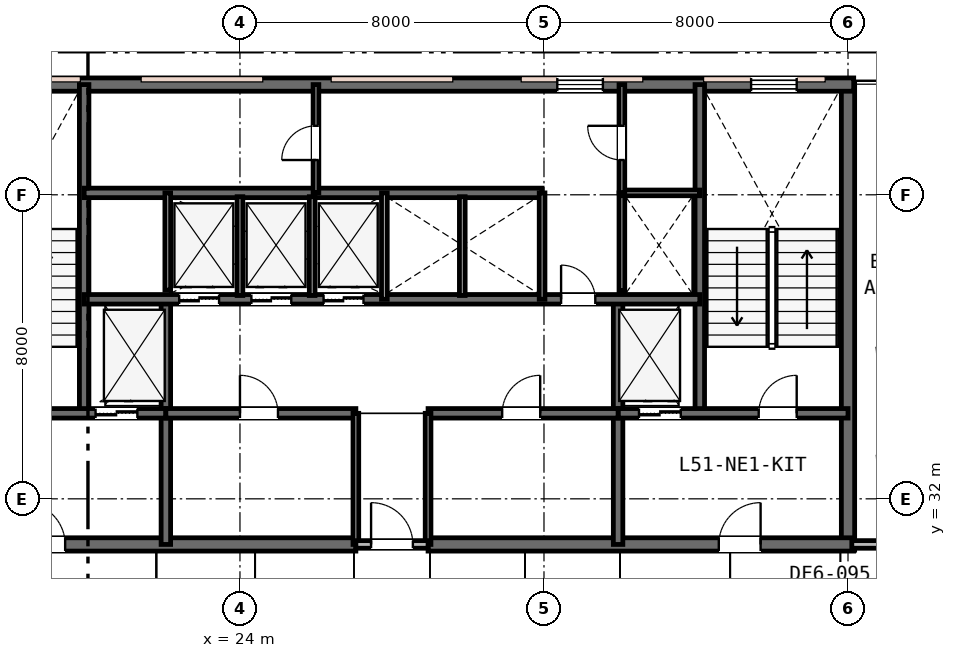
"""IFC4 building model, lengths in metres.
Left out: names, types, materials, properties, quantities, classifications, styles, units other than length and angle.
Written with IfcOpenShell. Run it as: python <this file> out.ifc"""

import sys

from ifc_helpers import new_model, si_unit, direction, frame, frame_2d, origin, place, context, subcontext, project, spatial, rectangle, extrude, element, fill, save


model = new_model("IFC4")
c1 = context("Model", 3, precision=1e-05, world=origin(), true_north=direction((0.0, 1.0)))
c2 = subcontext(c1, "Body", "Model", "MODEL_VIEW")
j1 = project(units=[si_unit("LENGTHUNIT", "METRE"), si_unit("PLANEANGLEUNIT", "RADIAN")], contexts=[c1])
p1 = place(None, origin())
s1 = spatial("IfcSite", under=j1, at=p1, CompositionType="ELEMENT")
p2 = place(p1, origin())
s2 = spatial("IfcBuilding", under=s1, at=p2, CompositionType="ELEMENT")
p3 = place(p2, frame((0.0, 0.0, 197.4)))
s3 = spatial("IfcBuildingStorey", under=s2, at=p3, CompositionType="ELEMENT", Elevation=197.4)
p4 = place(p3, frame((40.0, 30.65, 0.0), z_axis=(0.0, 0.0, 1.0), x_axis=(0.0, 1.0, 0.0)))
e1 = element("IfcWall", 1, at=p4, inside=s3, PredefinedType="SHEAR", context=c2, shape_type="SweptSolid", body=[
    extrude(rectangle(XDim=12.3, YDim=0.35, at=frame_2d((6.15, 0.0))), origin(), (0.0, 0.0, 1.0), 3.6),
])
p5 = place(p3, frame((15.85, 42.9, 0.0), z_axis=(0.0, 0.0, 1.0), x_axis=(1.0, 0.0, 0.0)))
e2 = element("IfcWall", 2, at=p5, inside=s3, PredefinedType="SHEAR", context=c2, shape_type="SweptSolid", body=[
    extrude(rectangle(XDim=24.3, YDim=0.35, at=frame_2d((12.15, 0.0))), origin(), (0.0, 0.0, 1.0), 3.6),
])
p6 = place(p5, frame((1.6, 0.0, 0.95)))
e3 = element("IfcOpeningElement", 3, at=p6, cuts=e2, PredefinedType="OPENING", context=c2, shape_type="SweptSolid", body=[
    extrude(rectangle(XDim=1.2, YDim=1.6, at=frame_2d((0.6, 0.8))), frame((0.0, 0.185, 0.0), z_axis=(0.0, -1.0, 0.0), x_axis=(1.0, 0.0, 0.0)), (0.0, 0.0, 1.0), 0.37),
])
p7 = place(p5, frame((16.5, 0.0, 0.95)))
e4 = element("IfcOpeningElement", 4, at=p7, cuts=e2, PredefinedType="OPENING", context=c2, shape_type="SweptSolid", body=[
    extrude(rectangle(XDim=1.2, YDim=1.6, at=frame_2d((0.6, 0.8))), frame((0.0, 0.185, 0.0), z_axis=(0.0, -1.0, 0.0), x_axis=(1.0, 0.0, 0.0)), (0.0, 0.0, 1.0), 0.37),
])
p8 = place(p5, frame((21.6, 0.0, 0.95)))
e5 = element("IfcOpeningElement", 5, at=p8, cuts=e2, PredefinedType="OPENING", context=c2, shape_type="SweptSolid", body=[
    extrude(rectangle(XDim=1.2, YDim=1.6, at=frame_2d((0.6, 0.8))), frame((0.0, 0.185, 0.0), z_axis=(0.0, -1.0, 0.0), x_axis=(1.0, 0.0, 0.0)), (0.0, 0.0, 1.0), 0.37),
])
p9 = place(p3, frame((15.85, 30.8, 0.0), z_axis=(0.0, 0.0, 1.0), x_axis=(1.0, 0.0, 0.0)))
e6 = element("IfcWall", 6, at=p9, inside=s3, PredefinedType="SHEAR", context=c2, shape_type="SweptSolid", body=[
    extrude(rectangle(XDim=11.2, YDim=0.35, at=frame_2d((5.6, 0.0))), origin(), (0.0, 0.0, 1.0), 3.6),
])
p10 = place(p9, frame((2.45, 0.0, 0.0)))
e7 = element("IfcOpeningElement", 7, at=p10, cuts=e6, PredefinedType="OPENING", context=c2, shape_type="SweptSolid", body=[
    extrude(rectangle(XDim=1.1, YDim=2.15, at=frame_2d((0.55, 1.075))), frame((0.0, 0.185, 0.0), z_axis=(0.0, -1.0, 0.0), x_axis=(1.0, 0.0, 0.0)), (0.0, 0.0, 1.0), 0.37),
])
p11 = place(p3, frame((28.95, 30.8, 0.0), z_axis=(0.0, 0.0, 1.0), x_axis=(1.0, 0.0, 0.0)))
e8 = element("IfcWall", 8, at=p11, inside=s3, PredefinedType="SHEAR", context=c2, shape_type="SweptSolid", body=[
    extrude(rectangle(XDim=11.2, YDim=0.35, at=frame_2d((5.6, 0.0))), origin(), (0.0, 0.0, 1.0), 3.6),
])
p12 = place(p11, frame((7.65, 0.0, 0.0)))
e9 = element("IfcOpeningElement", 9, at=p12, cuts=e8, PredefinedType="OPENING", context=c2, shape_type="SweptSolid", body=[
    extrude(rectangle(XDim=1.1, YDim=2.15, at=frame_2d((0.55, 1.075))), frame((0.0, 0.185, 0.0), z_axis=(0.0, -1.0, 0.0), x_axis=(1.0, 0.0, 0.0)), (0.0, 0.0, 1.0), 0.37),
])
for number, where, z_axis, x_axis in (
    (10, (19.9, 34.25, 0.0), (0.0, 0.0, 1.0), (0.0, 1.0, 0.0)),
    (11, (36.1, 34.25, 0.0), (0.0, 0.0, 1.0), (0.0, 1.0, 0.0)),
):
    element("IfcWall", number, at=place(p3, frame(where, z_axis=z_axis, x_axis=x_axis)), inside=s3, PredefinedType="SHEAR", context=c2, shape_type="SweptSolid", body=[
        extrude(rectangle(XDim=8.65, YDim=0.25, at=frame_2d((4.325, 0.0))), origin(), (0.0, 0.0, 1.0), 3.6),
    ])
for number, where, z_axis, x_axis in (
    (12, (22.05, 30.8, 0.0), (0.0, 0.0, 1.0), (0.0, 1.0, 0.0)),
    (13, (33.95, 30.8, 0.0), (0.0, 0.0, 1.0), (0.0, 1.0, 0.0)),
):
    element("IfcWall", number, at=place(p3, frame(where, z_axis=z_axis, x_axis=x_axis)), inside=s3, PredefinedType="SHEAR", context=c2, shape_type="SweptSolid", body=[
        extrude(rectangle(XDim=6.45, YDim=0.25, at=frame_2d((3.225, 0.0))), origin(), (0.0, 0.0, 1.0), 3.6),
    ])
p13 = place(p3, frame((16.0, 34.25, 0.0), z_axis=(0.0, 0.0, 1.0), x_axis=(1.0, 0.0, 0.0)))
e14 = element("IfcWall", 14, at=p13, inside=s3, PredefinedType="SHEAR", context=c2, shape_type="SweptSolid", body=[
    extrude(rectangle(XDim=6.05, YDim=0.25, at=frame_2d((3.025, 0.0))), origin(), (0.0, 0.0, 1.0), 3.6),
])
p14 = place(p13, frame((1.25, 0.0, 0.0)))
e15 = element("IfcOpeningElement", 15, at=p14, cuts=e14, PredefinedType="OPENING", context=c2, shape_type="SweptSolid", body=[
    extrude(rectangle(XDim=1.0, YDim=2.15, at=frame_2d((0.5, 1.075))), frame((0.0, 0.135, 0.0), z_axis=(0.0, -1.0, 0.0), x_axis=(1.0, 0.0, 0.0)), (0.0, 0.0, 1.0), 0.27),
])
p15 = place(p13, frame((4.2, 0.0, 0.0)))
e16 = element("IfcOpeningElement", 16, at=p15, cuts=e14, PredefinedType="OPENING", context=c2, shape_type="SweptSolid", body=[
    extrude(rectangle(XDim=1.1, YDim=2.15, at=frame_2d((0.55, 1.075))), frame((0.0, 0.135, 0.0), z_axis=(0.0, -1.0, 0.0), x_axis=(1.0, 0.0, 0.0)), (0.0, 0.0, 1.0), 0.27),
])
p16 = place(p3, frame((33.95, 34.25, 0.0), z_axis=(0.0, 0.0, 1.0), x_axis=(1.0, 0.0, 0.0)))
e17 = element("IfcWall", 17, at=p16, inside=s3, PredefinedType="SHEAR", context=c2, shape_type="SweptSolid", body=[
    extrude(rectangle(XDim=6.05, YDim=0.25, at=frame_2d((3.025, 0.0))), origin(), (0.0, 0.0, 1.0), 3.6),
])
p17 = place(p16, frame((3.7, 0.0, 0.0)))
e18 = element("IfcOpeningElement", 18, at=p17, cuts=e17, PredefinedType="OPENING", context=c2, shape_type="SweptSolid", body=[
    extrude(rectangle(XDim=1.0, YDim=2.15, at=frame_2d((0.5, 1.075))), frame((0.0, 0.135, 0.0), z_axis=(0.0, -1.0, 0.0), x_axis=(1.0, 0.0, 0.0)), (0.0, 0.0, 1.0), 0.27),
])
p18 = place(p16, frame((0.55, 0.0, 0.0)))
e19 = element("IfcOpeningElement", 19, at=p18, cuts=e17, PredefinedType="OPENING", context=c2, shape_type="SweptSolid", body=[
    extrude(rectangle(XDim=1.1, YDim=2.15, at=frame_2d((0.55, 1.075))), frame((0.0, 0.135, 0.0), z_axis=(0.0, -1.0, 0.0), x_axis=(1.0, 0.0, 0.0)), (0.0, 0.0, 1.0), 0.27),
])
p19 = place(p3, frame((22.05, 34.25, 0.0), z_axis=(0.0, 0.0, 1.0), x_axis=(1.0, 0.0, 0.0)))
e20 = element("IfcWall", 20, at=p19, inside=s3, PredefinedType="SHEAR", context=c2, shape_type="SweptSolid", body=[
    extrude(rectangle(XDim=5.0, YDim=0.25, at=frame_2d((2.5, 0.0))), origin(), (0.0, 0.0, 1.0), 3.6),
])
p20 = place(p19, frame((1.95, 0.0, 0.0)))
e21 = element("IfcOpeningElement", 21, at=p20, cuts=e20, PredefinedType="OPENING", context=c2, shape_type="SweptSolid", body=[
    extrude(rectangle(XDim=1.0, YDim=2.15, at=frame_2d((0.5, 1.075))), frame((0.0, 0.135, 0.0), z_axis=(0.0, -1.0, 0.0), x_axis=(1.0, 0.0, 0.0)), (0.0, 0.0, 1.0), 0.27),
])
p21 = place(p3, frame((28.95, 34.25, 0.0), z_axis=(0.0, 0.0, 1.0), x_axis=(1.0, 0.0, 0.0)))
e22 = element("IfcWall", 22, at=p21, inside=s3, PredefinedType="SHEAR", context=c2, shape_type="SweptSolid", body=[
    extrude(rectangle(XDim=5.0, YDim=0.25, at=frame_2d((2.5, 0.0))), origin(), (0.0, 0.0, 1.0), 3.6),
])
p22 = place(p21, frame((1.95, 0.0, 0.0)))
e23 = element("IfcOpeningElement", 23, at=p22, cuts=e22, PredefinedType="OPENING", context=c2, shape_type="SweptSolid", body=[
    extrude(rectangle(XDim=1.0, YDim=2.15, at=frame_2d((0.5, 1.075))), frame((0.0, 0.135, 0.0), z_axis=(0.0, -1.0, 0.0), x_axis=(1.0, 0.0, 0.0)), (0.0, 0.0, 1.0), 0.27),
])
p23 = place(p3, frame((19.9, 37.25, 0.0), z_axis=(0.0, 0.0, 1.0), x_axis=(1.0, 0.0, 0.0)))
e24 = element("IfcWall", 24, at=p23, inside=s3, PredefinedType="SHEAR", context=c2, shape_type="SweptSolid", body=[
    extrude(rectangle(XDim=16.2, YDim=0.25, at=frame_2d((8.1, 0.0))), origin(), (0.0, 0.0, 1.0), 3.6),
])
p24 = place(p23, frame((12.55, 0.0, 0.0)))
e25 = element("IfcOpeningElement", 25, at=p24, cuts=e24, PredefinedType="OPENING", context=c2, shape_type="SweptSolid", body=[
    extrude(rectangle(XDim=0.9, YDim=2.15, at=frame_2d((0.45, 1.075))), frame((0.0, 0.135, 0.0), z_axis=(0.0, -1.0, 0.0), x_axis=(1.0, 0.0, 0.0)), (0.0, 0.0, 1.0), 0.27),
])
p25 = place(p23, frame((2.5, 0.0, 0.0)))
e26 = element("IfcOpeningElement", 26, at=p25, cuts=e24, PredefinedType="OPENING", context=c2, shape_type="SweptSolid", body=[
    extrude(rectangle(XDim=1.05, YDim=2.15, at=frame_2d((0.525, 1.075))), frame((0.0, 0.135, 0.0), z_axis=(0.0, -1.0, 0.0), x_axis=(1.0, 0.0, 0.0)), (0.0, 0.0, 1.0), 0.27),
])
p26 = place(p23, frame((4.4, 0.0, 0.0)))
e27 = element("IfcOpeningElement", 27, at=p26, cuts=e24, PredefinedType="OPENING", context=c2, shape_type="SweptSolid", body=[
    extrude(rectangle(XDim=1.05, YDim=2.15, at=frame_2d((0.525, 1.075))), frame((0.0, 0.135, 0.0), z_axis=(0.0, -1.0, 0.0), x_axis=(1.0, 0.0, 0.0)), (0.0, 0.0, 1.0), 0.27),
])
p27 = place(p23, frame((6.3, 0.0, 0.0)))
e28 = element("IfcOpeningElement", 28, at=p27, cuts=e24, PredefinedType="OPENING", context=c2, shape_type="SweptSolid", body=[
    extrude(rectangle(XDim=1.05, YDim=2.15, at=frame_2d((0.525, 1.075))), frame((0.0, 0.135, 0.0), z_axis=(0.0, -1.0, 0.0), x_axis=(1.0, 0.0, 0.0)), (0.0, 0.0, 1.0), 0.27),
])
p28 = place(p3, frame((19.9, 40.05, 0.0), z_axis=(0.0, 0.0, 1.0), x_axis=(1.0, 0.0, 0.0)))
e29 = element("IfcWall", 29, at=p28, inside=s3, PredefinedType="SHEAR", context=c2, shape_type="SweptSolid", body=[
    extrude(rectangle(XDim=12.05, YDim=0.25, at=frame_2d((6.025, 0.0))), origin(), (0.0, 0.0, 1.0), 3.6),
])
for number, where, z_axis, x_axis in (
    (30, (27.05, 30.8, 0.0), (0.0, 0.0, 1.0), (0.0, 1.0, 0.0)),
    (31, (28.95, 30.8, 0.0), (0.0, 0.0, 1.0), (0.0, 1.0, 0.0)),
):
    element("IfcWall", number, at=place(p3, frame(where, z_axis=z_axis, x_axis=x_axis)), inside=s3, PredefinedType="PLUMBINGWALL", context=c2, shape_type="SweptSolid", body=[
        extrude(rectangle(XDim=3.45, YDim=0.15, at=frame_2d((1.725, 0.0))), origin(), (0.0, 0.0, 1.0), 3.07),
    ])
p29 = place(p3, frame((27.05, 30.8, 0.0), z_axis=(0.0, 0.0, 1.0), x_axis=(1.0, 0.0, 0.0)))
e32 = element("IfcWall", 32, at=p29, inside=s3, PredefinedType="PARTITIONING", context=c2, shape_type="SweptSolid", body=[
    extrude(rectangle(XDim=1.9, YDim=0.2, at=frame_2d((0.95, 0.0))), origin(), (0.0, 0.0, 1.0), 3.07),
])
p30 = place(p29, frame((0.4, 0.0, 0.0)))
e33 = element("IfcOpeningElement", 33, at=p30, cuts=e32, PredefinedType="OPENING", context=c2, shape_type="SweptSolid", body=[
    extrude(rectangle(XDim=1.1, YDim=2.15, at=frame_2d((0.55, 1.075))), frame((0.0, 0.11, 0.0), z_axis=(0.0, -1.0, 0.0), x_axis=(1.0, 0.0, 0.0)), (0.0, 0.0, 1.0), 0.22),
])
p31 = place(p3, frame((22.1, 37.49, 0.0), z_axis=(0.0, 0.0, 1.0), x_axis=(0.0, 1.0, 0.0)))
e34 = element("IfcWall", 34, at=p31, inside=s3, PredefinedType="PLUMBINGWALL", context=c2, shape_type="SweptSolid", body=[
    extrude(rectangle(XDim=2.56, YDim=0.15, at=frame_2d((1.28, 0.0))), origin(), (0.0, 0.0, 1.0), 3.33),
])
p32 = place(p3, frame((27.8, 37.25, 0.0), z_axis=(0.0, 0.0, 1.0), x_axis=(0.0, 1.0, 0.0)))
e35 = element("IfcWall", 35, at=p32, inside=s3, PredefinedType="PLUMBINGWALL", context=c2, shape_type="SweptSolid", body=[
    extrude(rectangle(XDim=2.8, YDim=0.15, at=frame_2d((1.4, 0.0))), origin(), (0.0, 0.0, 1.0), 3.33),
])
for number, where, z_axis, x_axis in (
    (36, (24.0, 37.35, 0.0), (0.0, 0.0, 1.0), (0.0, 1.0, 0.0)),
    (37, (25.9, 37.35, 0.0), (0.0, 0.0, 1.0), (0.0, 1.0, 0.0)),
):
    element("IfcWall", number, at=place(p3, frame(where, z_axis=z_axis, x_axis=x_axis)), inside=s3, PredefinedType="PLUMBINGWALL", context=c2, shape_type="SweptSolid", body=[
        extrude(rectangle(XDim=2.6, YDim=0.15, at=frame_2d((1.3, 0.0))), origin(), (0.0, 0.0, 1.0), 3.33),
    ])
p33 = place(p3, frame((31.95, 37.25, 0.0), z_axis=(0.0, 0.0, 1.0), x_axis=(0.0, 1.0, 0.0)))
e38 = element("IfcWall", 38, at=p33, inside=s3, PredefinedType="PLUMBINGWALL", context=c2, shape_type="SweptSolid", body=[
    extrude(rectangle(XDim=2.8, YDim=0.15, at=frame_2d((1.4, 0.0))), origin(), (0.0, 0.0, 1.0), 3.33),
])
p34 = place(p3, frame((29.85, 37.35, 0.0), z_axis=(0.0, 0.0, 1.0), x_axis=(0.0, 1.0, 0.0)))
e39 = element("IfcWall", 39, at=p34, inside=s3, PredefinedType="PLUMBINGWALL", context=c2, shape_type="SweptSolid", body=[
    extrude(rectangle(XDim=2.6, YDim=0.15, at=frame_2d((1.3, 0.0))), origin(), (0.0, 0.0, 1.0), 3.33),
])
p35 = place(p3, frame((34.05, 37.473, 0.0), z_axis=(0.0, 0.0, 1.0), x_axis=(0.0, 1.0, 0.0)))
e40 = element("IfcWall", 40, at=p35, inside=s3, PredefinedType="PLUMBINGWALL", context=c2, shape_type="SweptSolid", body=[
    extrude(rectangle(XDim=2.577, YDim=0.15, at=frame_2d((1.288, 0.0))), origin(), (0.0, 0.0, 1.0), 3.33),
])
p36 = place(p3, frame((34.05, 40.05, 0.0), z_axis=(0.0, 0.0, 1.0), x_axis=(1.0, 0.0, 0.0)))
e41 = element("IfcWall", 41, at=p36, inside=s3, PredefinedType="PARTITIONING", context=c2, shape_type="SweptSolid", body=[
    extrude(rectangle(XDim=2.05, YDim=0.15, at=frame_2d((1.025, 0.0))), origin(), (0.0, 0.0, 1.0), 3.33),
])
p37 = place(p3, frame((34.05, 40.05, 0.0), z_axis=(0.0, 0.0, 1.0), x_axis=(0.0, 1.0, 0.0)))
e42 = element("IfcWall", 42, at=p37, inside=s3, PredefinedType="PARTITIONING", context=c2, shape_type="SweptSolid", body=[
    extrude(rectangle(XDim=2.85, YDim=0.15, at=frame_2d((1.425, 0.0))), origin(), (0.0, 0.0, 1.0), 3.33),
])
p38 = place(p37, frame((0.865, 0.0, 0.0)))
e43 = element("IfcOpeningElement", 43, at=p38, cuts=e42, PredefinedType="OPENING", context=c2, shape_type="SweptSolid", body=[
    extrude(rectangle(XDim=0.9, YDim=2.15, at=frame_2d((0.45, 1.075))), frame((0.0, 0.085, 0.0), z_axis=(0.0, -1.0, 0.0), x_axis=(1.0, 0.0, 0.0)), (0.0, 0.0, 1.0), 0.17),
])
p39 = place(p3, frame((26.0, 40.05, 0.0), z_axis=(0.0, 0.0, 1.0), x_axis=(0.0, 1.0, 0.0)))
e44 = element("IfcWall", 44, at=p39, inside=s3, PredefinedType="PARTITIONING", context=c2, shape_type="SweptSolid", body=[
    extrude(rectangle(XDim=2.85, YDim=0.15, at=frame_2d((1.425, 0.0))), origin(), (0.0, 0.0, 1.0), 3.33),
])
p40 = place(p39, frame((0.865, 0.0, 0.0)))
e45 = element("IfcOpeningElement", 45, at=p40, cuts=e44, PredefinedType="OPENING", context=c2, shape_type="SweptSolid", body=[
    extrude(rectangle(XDim=0.9, YDim=2.15, at=frame_2d((0.45, 1.075))), frame((0.0, 0.085, 0.0), z_axis=(0.0, -1.0, 0.0), x_axis=(1.0, 0.0, 0.0)), (0.0, 0.0, 1.0), 0.17),
])
p41 = place(p3, frame((40.1, 30.8, 0.0), z_axis=(0.0, 0.0, 1.0), x_axis=(1.0, 0.0, 0.0)))
e46 = element("IfcWall", 46, at=p41, inside=s3, PredefinedType="PARTITIONING", context=c2, shape_type="SweptSolid", body=[
    extrude(rectangle(XDim=3.1, YDim=0.2, at=frame_2d((1.55, 0.0))), origin(), (0.0, 0.0, 1.0), 2.92),
])
p42 = place(p41, frame((1.075, 0.0, 0.0)))
e47 = element("IfcOpeningElement", 47, at=p42, cuts=e46, PredefinedType="OPENING", context=c2, shape_type="SweptSolid", body=[
    extrude(rectangle(XDim=0.95, YDim=2.15, at=frame_2d((0.475, 1.075))), frame((0.0, 0.11, 0.0), z_axis=(0.0, -1.0, 0.0), x_axis=(1.0, 0.0, 0.0)), (0.0, 0.0, 1.0), 0.22),
])
p43 = place(p7, origin())
e48 = element("IfcWindow", 48, at=p43, inside=s3, PartitioningType="SINGLE_PANEL", PredefinedType="WINDOW", context=c2, shape_type="SweptSolid", body=[
    extrude(rectangle(XDim=1.2, YDim=1.6, at=frame_2d((0.6, 0.8))), frame((0.0, 0.03, 0.0), z_axis=(0.0, -1.0, 0.0), x_axis=(1.0, 0.0, 0.0)), (0.0, 0.0, 1.0), 0.06),
])
fill(e4, e48)
p44 = place(p8, origin())
e49 = element("IfcWindow", 49, at=p44, inside=s3, PartitioningType="SINGLE_PANEL", PredefinedType="WINDOW", context=c2, shape_type="SweptSolid", body=[
    extrude(rectangle(XDim=1.2, YDim=1.6, at=frame_2d((0.6, 0.8))), frame((0.0, 0.03, 0.0), z_axis=(0.0, -1.0, 0.0), x_axis=(1.0, 0.0, 0.0)), (0.0, 0.0, 1.0), 0.06),
])
fill(e5, e49)
p45 = place(p30, origin())
e50 = element("IfcDoor", 50, at=p45, inside=s3, OperationType="SINGLE_SWING_LEFT", PredefinedType="DOOR", context=c2, shape_type="SweptSolid", body=[
    extrude(rectangle(XDim=1.1, YDim=2.15, at=frame_2d((0.55, 1.075))), frame((0.0, 0.025, 0.0), z_axis=(0.0, -1.0, 0.0), x_axis=(1.0, 0.0, 0.0)), (0.0, 0.0, 1.0), 0.05),
])
fill(e33, e50)
p46 = place(p17, origin())
e51 = element("IfcDoor", 51, at=p46, inside=s3, OperationType="SINGLE_SWING_RIGHT", PredefinedType="DOOR", context=c2, shape_type="SweptSolid", body=[
    extrude(rectangle(XDim=1.0, YDim=2.15, at=frame_2d((0.5, 1.075))), frame((0.0, 0.025, 0.0), z_axis=(0.0, -1.0, 0.0), x_axis=(1.0, 0.0, 0.0)), (0.0, 0.0, 1.0), 0.05),
])
fill(e18, e51)
p47 = place(p10, origin())
e52 = element("IfcDoor", 52, at=p47, inside=s3, OperationType="SINGLE_SWING_LEFT", PredefinedType="DOOR", context=c2, shape_type="SweptSolid", body=[
    extrude(rectangle(XDim=1.1, YDim=2.15, at=frame_2d((0.55, 1.075))), frame((0.0, 0.025, 0.0), z_axis=(0.0, -1.0, 0.0), x_axis=(1.0, 0.0, 0.0)), (0.0, 0.0, 1.0), 0.05),
])
fill(e7, e52)
p48 = place(p12, origin())
e53 = element("IfcDoor", 53, at=p48, inside=s3, OperationType="SINGLE_SWING_RIGHT", PredefinedType="DOOR", context=c2, shape_type="SweptSolid", body=[
    extrude(rectangle(XDim=1.1, YDim=2.15, at=frame_2d((0.55, 1.075))), frame((0.0, 0.025, 0.0), z_axis=(0.0, -1.0, 0.0), x_axis=(1.0, 0.0, 0.0)), (0.0, 0.0, 1.0), 0.05),
])
fill(e9, e53)
p49 = place(p20, origin())
e54 = element("IfcDoor", 54, at=p49, inside=s3, OperationType="SINGLE_SWING_LEFT", PredefinedType="DOOR", context=c2, shape_type="SweptSolid", body=[
    extrude(rectangle(XDim=1.0, YDim=2.15, at=frame_2d((0.5, 1.075))), frame((0.0, 0.025, 0.0), z_axis=(0.0, -1.0, 0.0), x_axis=(1.0, 0.0, 0.0)), (0.0, 0.0, 1.0), 0.05),
])
fill(e21, e54)
p50 = place(p22, origin())
e55 = element("IfcDoor", 55, at=p50, inside=s3, OperationType="SINGLE_SWING_RIGHT", PredefinedType="DOOR", context=c2, shape_type="SweptSolid", body=[
    extrude(rectangle(XDim=1.0, YDim=2.15, at=frame_2d((0.5, 1.075))), frame((0.0, 0.025, 0.0), z_axis=(0.0, -1.0, 0.0), x_axis=(1.0, 0.0, 0.0)), (0.0, 0.0, 1.0), 0.05),
])
fill(e23, e55)
p51 = place(p24, origin())
e56 = element("IfcDoor", 56, at=p51, inside=s3, OperationType="SINGLE_SWING_LEFT", PredefinedType="DOOR", context=c2, shape_type="SweptSolid", body=[
    extrude(rectangle(XDim=0.9, YDim=2.15, at=frame_2d((0.45, 1.075))), frame((0.0, 0.025, 0.0), z_axis=(0.0, -1.0, 0.0), x_axis=(1.0, 0.0, 0.0)), (0.0, 0.0, 1.0), 0.05),
])
fill(e25, e56)
p52 = place(p38, origin())
e57 = element("IfcDoor", 57, at=p52, inside=s3, OperationType="SINGLE_SWING_RIGHT", PredefinedType="DOOR", context=c2, shape_type="SweptSolid", body=[
    extrude(rectangle(XDim=0.9, YDim=2.15, at=frame_2d((0.45, 1.075))), frame((0.0, 0.025, 0.0), z_axis=(0.0, -1.0, 0.0), x_axis=(1.0, 0.0, 0.0)), (0.0, 0.0, 1.0), 0.05),
])
fill(e43, e57)
p53 = place(p40, origin())
e58 = element("IfcDoor", 58, at=p53, inside=s3, OperationType="SINGLE_SWING_LEFT", PredefinedType="DOOR", context=c2, shape_type="SweptSolid", body=[
    extrude(rectangle(XDim=0.9, YDim=2.15, at=frame_2d((0.45, 1.075))), frame((0.0, 0.025, 0.0), z_axis=(0.0, -1.0, 0.0), x_axis=(1.0, 0.0, 0.0)), (0.0, 0.0, 1.0), 0.05),
])
fill(e45, e58)
p54 = place(p15, origin())
e59 = element("IfcDoor", 59, at=p54, inside=s3, OperationType="DOUBLE_DOOR_SLIDING", PredefinedType="DOOR", context=c2, shape_type="SweptSolid", body=[
    extrude(rectangle(XDim=1.1, YDim=2.15, at=frame_2d((0.55, 1.075))), frame((0.0, 0.025, 0.0), z_axis=(0.0, -1.0, 0.0), x_axis=(1.0, 0.0, 0.0)), (0.0, 0.0, 1.0), 0.05),
])
fill(e16, e59)
p55 = place(p18, origin())
e60 = element("IfcDoor", 60, at=p55, inside=s3, OperationType="DOUBLE_DOOR_SLIDING", PredefinedType="DOOR", context=c2, shape_type="SweptSolid", body=[
    extrude(rectangle(XDim=1.1, YDim=2.15, at=frame_2d((0.55, 1.075))), frame((0.0, 0.025, 0.0), z_axis=(0.0, -1.0, 0.0), x_axis=(1.0, 0.0, 0.0)), (0.0, 0.0, 1.0), 0.05),
])
fill(e19, e60)
p56 = place(p25, origin())
e61 = element("IfcDoor", 61, at=p56, inside=s3, OperationType="DOUBLE_DOOR_SLIDING", PredefinedType="DOOR", context=c2, shape_type="SweptSolid", body=[
    extrude(rectangle(XDim=1.05, YDim=2.15, at=frame_2d((0.525, 1.075))), frame((0.0, 0.025, 0.0), z_axis=(0.0, -1.0, 0.0), x_axis=(1.0, 0.0, 0.0)), (0.0, 0.0, 1.0), 0.05),
])
fill(e26, e61)
p57 = place(p26, origin())
e62 = element("IfcDoor", 62, at=p57, inside=s3, OperationType="DOUBLE_DOOR_SLIDING", PredefinedType="DOOR", context=c2, shape_type="SweptSolid", body=[
    extrude(rectangle(XDim=1.05, YDim=2.15, at=frame_2d((0.525, 1.075))), frame((0.0, 0.025, 0.0), z_axis=(0.0, -1.0, 0.0), x_axis=(1.0, 0.0, 0.0)), (0.0, 0.0, 1.0), 0.05),
])
fill(e27, e62)
p58 = place(p27, origin())
e63 = element("IfcDoor", 63, at=p58, inside=s3, OperationType="DOUBLE_DOOR_SLIDING", PredefinedType="DOOR", context=c2, shape_type="SweptSolid", body=[
    extrude(rectangle(XDim=1.05, YDim=2.15, at=frame_2d((0.525, 1.075))), frame((0.0, 0.025, 0.0), z_axis=(0.0, -1.0, 0.0), x_axis=(1.0, 0.0, 0.0)), (0.0, 0.0, 1.0), 0.05),
])
fill(e28, e63)
save(model, sys.argv[1])
